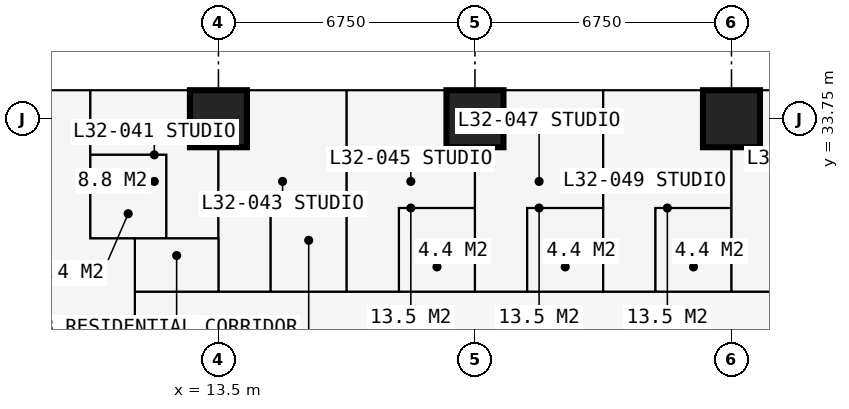
"""IFC4 building model, lengths in metres.
Left out: names, types, materials, properties, quantities, classifications, styles, units other than length and angle.
Written with IfcOpenShell. Run it as: python <this file> out.ifc"""

import sys

from ifc_helpers import new_model, si_unit, direction, frame, frame_2d, origin, origin_2d, place, context, subcontext, project, spatial, rectangle, extrude, element, fill, save


model = new_model("IFC4")
c1 = context("Model", 3, precision=1e-05, world=origin(), true_north=direction((0.0, 1.0)))
c2 = subcontext(c1, "Body", "Model", "MODEL_VIEW")
j1 = project(units=[si_unit("LENGTHUNIT", "METRE"), si_unit("PLANEANGLEUNIT", "RADIAN")], contexts=[c1])
p1 = place(None, origin())
s1 = spatial("IfcSite", under=j1, at=p1, CompositionType="ELEMENT")
p2 = place(p1, origin())
s2 = spatial("IfcBuilding", under=s1, at=p2, CompositionType="ELEMENT")
p3 = place(p2, frame((0.0, 0.0, 119.7)))
s3 = spatial("IfcBuildingStorey", under=s2, at=p3, CompositionType="ELEMENT", Elevation=119.7)
for number, where, z_axis, x_axis in (
    (1, (13.5, 33.75, 0.0), (0.0, 0.0, 1.0), (1.0, 0.0, 0.0)),
    (2, (20.25, 33.75, 0.0), (0.0, 0.0, 1.0), (1.0, 0.0, 0.0)),
    (3, (27.0, 33.75, 0.0), (0.0, 0.0, 1.0), (1.0, 0.0, 0.0)),
):
    element("IfcColumn", number, at=place(p3, frame(where, z_axis=z_axis, x_axis=x_axis)), inside=s3, PredefinedType="COLUMN", context=c2, shape_type="SweptSolid", body=[
        extrude(rectangle(XDim=1.5, YDim=1.5, at=origin_2d()), origin(), (0.0, 0.0, 1.0), 3.6),
    ])
p4 = place(p3, frame((20.25, 34.5, 0.0), z_axis=(0.0, 0.0, 1.0), x_axis=(1.0, 0.0, 0.0)))
e4 = element("IfcWall", 4, at=p4, inside=s3, PredefinedType="SOLIDWALL", context=c2, shape_type="SweptSolid", body=[
    extrude(rectangle(XDim=6.75, YDim=0.15, at=frame_2d((3.375, 0.0))), origin(), (0.0, 0.0, 1.0), 3.375),
])
p5 = place(p4, frame((0.863, 0.0, 0.0)))
e5 = element("IfcOpeningElement", 5, at=p5, cuts=e4, PredefinedType="OPENING", context=c2, shape_type="SweptSolid", body=[
    extrude(rectangle(XDim=1.0, YDim=2.2, at=frame_2d((0.5, 1.1))), frame((0.0, 0.085, 0.0), z_axis=(0.0, -1.0, 0.0), x_axis=(1.0, 0.0, 0.0)), (0.0, 0.0, 1.0), 0.17),
])
p6 = place(p4, frame((1.975, 0.0, 0.9)))
e6 = element("IfcOpeningElement", 6, at=p6, cuts=e4, PredefinedType="OPENING", context=c2, shape_type="SweptSolid", body=[
    extrude(rectangle(XDim=1.2, YDim=1.8, at=frame_2d((0.6, 0.9))), frame((0.0, 0.085, 0.0), z_axis=(0.0, -1.0, 0.0), x_axis=(1.0, 0.0, 0.0)), (0.0, 0.0, 1.0), 0.17),
])
p7 = place(p4, frame((4.887, 0.0, 0.0)))
e7 = element("IfcOpeningElement", 7, at=p7, cuts=e4, PredefinedType="OPENING", context=c2, shape_type="SweptSolid", body=[
    extrude(rectangle(XDim=1.0, YDim=2.2, at=frame_2d((0.5, 1.1))), frame((0.0, 0.085, 0.0), z_axis=(0.0, -1.0, 0.0), x_axis=(1.0, 0.0, 0.0)), (0.0, 0.0, 1.0), 0.17),
])
p8 = place(p4, frame((3.575, 0.0, 0.9)))
e8 = element("IfcOpeningElement", 8, at=p8, cuts=e4, PredefinedType="OPENING", context=c2, shape_type="SweptSolid", body=[
    extrude(rectangle(XDim=1.2, YDim=1.8, at=frame_2d((0.6, 0.9))), frame((0.0, 0.085, 0.0), z_axis=(0.0, -1.0, 0.0), x_axis=(1.0, 0.0, 0.0)), (0.0, 0.0, 1.0), 0.17),
])
p9 = place(p3, frame((23.625, 34.6, 0.0), z_axis=(0.0, 0.0, 1.0), x_axis=(0.0, 1.0, 0.0)))
e9 = element("IfcWall", 9, at=p9, inside=s3, PredefinedType="USERDEFINED", context=c2, shape_type="SweptSolid", body=[
    extrude(rectangle(XDim=2.2, YDim=1.0, at=frame_2d((1.1, 0.0))), origin(), (0.0, 0.0, 1.0), 0.9),
])
p10 = place(p3, frame((10.125, 30.6, 0.0), z_axis=(0.0, 0.0, 1.0), x_axis=(0.0, 1.0, 0.0)))
e10 = element("IfcWall", 10, at=p10, inside=s3, PredefinedType="PARTITIONING", context=c2, shape_type="SweptSolid", body=[
    extrude(rectangle(XDim=3.884, YDim=0.1, at=frame_2d((1.942, 0.0))), origin(), (0.0, 0.0, 1.0), 3.375),
])
p11 = place(p3, frame((10.125, 30.6, 0.0), z_axis=(0.0, 0.0, 1.0), x_axis=(1.0, 0.0, 0.0)))
e11 = element("IfcWall", 11, at=p11, inside=s3, PredefinedType="PARTITIONING", context=c2, shape_type="SweptSolid", body=[
    extrude(rectangle(XDim=3.375, YDim=0.1, at=frame_2d((1.688, 0.0))), origin(), (0.0, 0.0, 1.0), 3.375),
])
p12 = place(p11, frame((2.2, 0.0, 0.0)))
e12 = element("IfcOpeningElement", 12, at=p12, cuts=e11, PredefinedType="OPENING", context=c2, shape_type="SweptSolid", body=[
    extrude(rectangle(XDim=0.95, YDim=2.2, at=frame_2d((0.475, 1.1))), frame((0.0, 0.06, 0.0), z_axis=(0.0, -1.0, 0.0), x_axis=(1.0, 0.0, 0.0)), (0.0, 0.0, 1.0), 0.12),
])
p13 = place(p3, frame((10.125, 32.8, 0.0), z_axis=(0.0, 0.0, 1.0), x_axis=(1.0, 0.0, 0.0)))
e13 = element("IfcWall", 13, at=p13, inside=s3, PredefinedType="PARTITIONING", context=c2, shape_type="SweptSolid", body=[
    extrude(rectangle(XDim=2.0, YDim=0.1, at=frame_2d((1.0, 0.0))), origin(), (0.0, 0.0, 1.0), 3.375),
])
p14 = place(p3, frame((11.3, 11.3, 0.0), z_axis=(0.0, 0.0, 1.0), x_axis=(0.0, 1.0, 0.0)))
e14 = element("IfcWall", 14, at=p14, inside=s3, PredefinedType="PARTITIONING", context=c2, shape_type="SweptSolid", body=[
    extrude(rectangle(XDim=19.3, YDim=0.15, at=frame_2d((9.65, 0.0))), origin(), (0.0, 0.0, 1.0), 3.375),
])
p15 = place(p14, frame((18.1, 0.0, 0.0)))
e15 = element("IfcOpeningElement", 15, at=p15, cuts=e14, PredefinedType="OPENING", context=c2, shape_type="SweptSolid", body=[
    extrude(rectangle(XDim=1.0, YDim=2.2, at=frame_2d((0.5, 1.1))), frame((0.0, 0.085, 0.0), z_axis=(0.0, -1.0, 0.0), x_axis=(1.0, 0.0, 0.0)), (0.0, 0.0, 1.0), 0.17),
])
p16 = place(p14, frame((10.137, 0.0, 0.0)))
e16 = element("IfcOpeningElement", 16, at=p16, cuts=e14, PredefinedType="OPENING", context=c2, shape_type="SweptSolid", body=[
    extrude(rectangle(XDim=1.0, YDim=2.2, at=frame_2d((0.5, 1.1))), frame((0.0, 0.085, 0.0), z_axis=(0.0, -1.0, 0.0), x_axis=(1.0, 0.0, 0.0)), (0.0, 0.0, 1.0), 0.17),
])
p17 = place(p3, frame((11.3, 29.2, 0.0), z_axis=(0.0, 0.0, 1.0), x_axis=(1.0, 0.0, 0.0)))
e17 = element("IfcWall", 17, at=p17, inside=s3, PredefinedType="PARTITIONING", context=c2, shape_type="SweptSolid", body=[
    extrude(rectangle(XDim=19.075, YDim=0.15, at=frame_2d((9.538, 0.0))), origin(), (0.0, 0.0, 1.0), 3.375),
])
p18 = place(p17, frame((5.825, 0.0, 0.0)))
e18 = element("IfcOpeningElement", 18, at=p18, cuts=e17, PredefinedType="OPENING", context=c2, shape_type="SweptSolid", body=[
    extrude(rectangle(XDim=0.95, YDim=2.2, at=frame_2d((0.475, 1.1))), frame((0.0, 0.085, 0.0), z_axis=(0.0, -1.0, 0.0), x_axis=(1.0, 0.0, 0.0)), (0.0, 0.0, 1.0), 0.17),
])
p19 = place(p17, frame((9.2, 0.0, 0.0)))
e19 = element("IfcOpeningElement", 19, at=p19, cuts=e17, PredefinedType="OPENING", context=c2, shape_type="SweptSolid", body=[
    extrude(rectangle(XDim=0.95, YDim=2.2, at=frame_2d((0.475, 1.1))), frame((0.0, 0.085, 0.0), z_axis=(0.0, -1.0, 0.0), x_axis=(1.0, 0.0, 0.0)), (0.0, 0.0, 1.0), 0.17),
])
p20 = place(p17, frame((12.575, 0.0, 0.0)))
e20 = element("IfcOpeningElement", 20, at=p20, cuts=e17, PredefinedType="OPENING", context=c2, shape_type="SweptSolid", body=[
    extrude(rectangle(XDim=0.95, YDim=2.2, at=frame_2d((0.475, 1.1))), frame((0.0, 0.085, 0.0), z_axis=(0.0, -1.0, 0.0), x_axis=(1.0, 0.0, 0.0)), (0.0, 0.0, 1.0), 0.17),
])
p21 = place(p17, frame((15.95, 0.0, 0.0)))
e21 = element("IfcOpeningElement", 21, at=p21, cuts=e17, PredefinedType="OPENING", context=c2, shape_type="SweptSolid", body=[
    extrude(rectangle(XDim=0.95, YDim=2.2, at=frame_2d((0.475, 1.1))), frame((0.0, 0.085, 0.0), z_axis=(0.0, -1.0, 0.0), x_axis=(1.0, 0.0, 0.0)), (0.0, 0.0, 1.0), 0.17),
])
p22 = place(p17, frame((0.6, 0.0, 0.0)))
e22 = element("IfcOpeningElement", 22, at=p22, cuts=e17, PredefinedType="OPENING", context=c2, shape_type="SweptSolid", body=[
    extrude(rectangle(XDim=1.0, YDim=2.2, at=frame_2d((0.5, 1.1))), frame((0.0, 0.085, 0.0), z_axis=(0.0, -1.0, 0.0), x_axis=(1.0, 0.0, 0.0)), (0.0, 0.0, 1.0), 0.17),
])
p23 = place(p3, frame((12.125, 30.6, 0.0), z_axis=(0.0, 0.0, 1.0), x_axis=(0.0, 1.0, 0.0)))
e23 = element("IfcWall", 23, at=p23, inside=s3, PredefinedType="PARTITIONING", context=c2, shape_type="SweptSolid", body=[
    extrude(rectangle(XDim=2.2, YDim=0.1, at=frame_2d((1.1, 0.0))), origin(), (0.0, 0.0, 1.0), 3.375),
])
p24 = place(p23, frame((0.65, 0.0, 0.0)))
e24 = element("IfcOpeningElement", 24, at=p24, cuts=e23, PredefinedType="OPENING", context=c2, shape_type="SweptSolid", body=[
    extrude(rectangle(XDim=0.9, YDim=2.2, at=frame_2d((0.45, 1.1))), frame((0.0, 0.06, 0.0), z_axis=(0.0, -1.0, 0.0), x_axis=(1.0, 0.0, 0.0)), (0.0, 0.0, 1.0), 0.12),
])
p25 = place(p3, frame((13.5, 29.2, 0.0), z_axis=(0.0, 0.0, 1.0), x_axis=(0.0, 1.0, 0.0)))
e25 = element("IfcWall", 25, at=p25, inside=s3, PredefinedType="PARTITIONING", context=c2, shape_type="SweptSolid", body=[
    extrude(rectangle(XDim=5.284, YDim=0.175, at=frame_2d((2.642, 0.0))), origin(), (0.0, 0.0, 1.0), 2.61),
])
p26 = place(p25, frame((0.25, 0.0, 0.0)))
e26 = element("IfcOpeningElement", 26, at=p26, cuts=e25, PredefinedType="OPENING", context=c2, shape_type="SweptSolid", body=[
    extrude(rectangle(XDim=0.95, YDim=2.2, at=frame_2d((0.475, 1.1))), frame((0.0, 0.097, 0.0), z_axis=(0.0, -1.0, 0.0), x_axis=(1.0, 0.0, 0.0)), (0.0, 0.0, 1.0), 0.195),
])
p27 = place(p3, frame((14.875, 29.2, 0.0), z_axis=(0.0, 0.0, 1.0), x_axis=(0.0, 1.0, 0.0)))
e27 = element("IfcWall", 27, at=p27, inside=s3, PredefinedType="PARTITIONING", context=c2, shape_type="SweptSolid", body=[
    extrude(rectangle(XDim=2.2, YDim=0.1, at=frame_2d((1.1, 0.0))), origin(), (0.0, 0.0, 1.0), 3.375),
])
p28 = place(p27, frame((0.65, 0.0, 0.0)))
e28 = element("IfcOpeningElement", 28, at=p28, cuts=e27, PredefinedType="OPENING", context=c2, shape_type="SweptSolid", body=[
    extrude(rectangle(XDim=0.9, YDim=2.2, at=frame_2d((0.45, 1.1))), frame((0.0, 0.06, 0.0), z_axis=(0.0, -1.0, 0.0), x_axis=(1.0, 0.0, 0.0)), (0.0, 0.0, 1.0), 0.12),
])
p29 = place(p3, frame((14.875, 31.4, 0.0), z_axis=(0.0, 0.0, 1.0), x_axis=(1.0, 0.0, 0.0)))
e29 = element("IfcWall", 29, at=p29, inside=s3, PredefinedType="PARTITIONING", context=c2, shape_type="SweptSolid", body=[
    extrude(rectangle(XDim=2.0, YDim=0.1, at=frame_2d((1.0, 0.0))), origin(), (0.0, 0.0, 1.0), 3.375),
])
p30 = place(p3, frame((16.875, 29.2, 0.0), z_axis=(0.0, 0.0, 1.0), x_axis=(0.0, 1.0, 0.0)))
e30 = element("IfcWall", 30, at=p30, inside=s3, PredefinedType="PARTITIONING", context=c2, shape_type="SweptSolid", body=[
    extrude(rectangle(XDim=5.284, YDim=0.175, at=frame_2d((2.642, 0.0))), origin(), (0.0, 0.0, 1.0), 3.375),
])
p31 = place(p3, frame((18.25, 29.2, 0.0), z_axis=(0.0, 0.0, 1.0), x_axis=(0.0, 1.0, 0.0)))
e31 = element("IfcWall", 31, at=p31, inside=s3, PredefinedType="PARTITIONING", context=c2, shape_type="SweptSolid", body=[
    extrude(rectangle(XDim=2.2, YDim=0.1, at=frame_2d((1.1, 0.0))), origin(), (0.0, 0.0, 1.0), 3.375),
])
p32 = place(p31, frame((0.65, 0.0, 0.0)))
e32 = element("IfcOpeningElement", 32, at=p32, cuts=e31, PredefinedType="OPENING", context=c2, shape_type="SweptSolid", body=[
    extrude(rectangle(XDim=0.9, YDim=2.2, at=frame_2d((0.45, 1.1))), frame((0.0, 0.06, 0.0), z_axis=(0.0, -1.0, 0.0), x_axis=(1.0, 0.0, 0.0)), (0.0, 0.0, 1.0), 0.12),
])
p33 = place(p3, frame((18.25, 31.4, 0.0), z_axis=(0.0, 0.0, 1.0), x_axis=(1.0, 0.0, 0.0)))
e33 = element("IfcWall", 33, at=p33, inside=s3, PredefinedType="PARTITIONING", context=c2, shape_type="SweptSolid", body=[
    extrude(rectangle(XDim=2.0, YDim=0.1, at=frame_2d((1.0, 0.0))), origin(), (0.0, 0.0, 1.0), 3.375),
])
p34 = place(p3, frame((20.25, 29.2, 0.0), z_axis=(0.0, 0.0, 1.0), x_axis=(0.0, 1.0, 0.0)))
e34 = element("IfcWall", 34, at=p34, inside=s3, PredefinedType="PARTITIONING", context=c2, shape_type="SweptSolid", body=[
    extrude(rectangle(XDim=5.284, YDim=0.175, at=frame_2d((2.642, 0.0))), origin(), (0.0, 0.0, 1.0), 2.61),
])
p35 = place(p3, frame((21.625, 29.2, 0.0), z_axis=(0.0, 0.0, 1.0), x_axis=(0.0, 1.0, 0.0)))
e35 = element("IfcWall", 35, at=p35, inside=s3, PredefinedType="PARTITIONING", context=c2, shape_type="SweptSolid", body=[
    extrude(rectangle(XDim=2.2, YDim=0.1, at=frame_2d((1.1, 0.0))), origin(), (0.0, 0.0, 1.0), 3.375),
])
p36 = place(p35, frame((0.65, 0.0, 0.0)))
e36 = element("IfcOpeningElement", 36, at=p36, cuts=e35, PredefinedType="OPENING", context=c2, shape_type="SweptSolid", body=[
    extrude(rectangle(XDim=0.9, YDim=2.2, at=frame_2d((0.45, 1.1))), frame((0.0, 0.06, 0.0), z_axis=(0.0, -1.0, 0.0), x_axis=(1.0, 0.0, 0.0)), (0.0, 0.0, 1.0), 0.12),
])
p37 = place(p3, frame((21.625, 31.4, 0.0), z_axis=(0.0, 0.0, 1.0), x_axis=(1.0, 0.0, 0.0)))
e37 = element("IfcWall", 37, at=p37, inside=s3, PredefinedType="PARTITIONING", context=c2, shape_type="SweptSolid", body=[
    extrude(rectangle(XDim=2.0, YDim=0.1, at=frame_2d((1.0, 0.0))), origin(), (0.0, 0.0, 1.0), 3.375),
])
p38 = place(p3, frame((23.625, 29.2, 0.0), z_axis=(0.0, 0.0, 1.0), x_axis=(0.0, 1.0, 0.0)))
e38 = element("IfcWall", 38, at=p38, inside=s3, PredefinedType="PARTITIONING", context=c2, shape_type="SweptSolid", body=[
    extrude(rectangle(XDim=5.284, YDim=0.175, at=frame_2d((2.642, 0.0))), origin(), (0.0, 0.0, 1.0), 3.375),
])
p39 = place(p3, frame((25.0, 29.2, 0.0), z_axis=(0.0, 0.0, 1.0), x_axis=(0.0, 1.0, 0.0)))
e39 = element("IfcWall", 39, at=p39, inside=s3, PredefinedType="PARTITIONING", context=c2, shape_type="SweptSolid", body=[
    extrude(rectangle(XDim=2.2, YDim=0.1, at=frame_2d((1.1, 0.0))), origin(), (0.0, 0.0, 1.0), 3.375),
])
p40 = place(p39, frame((0.65, 0.0, 0.0)))
e40 = element("IfcOpeningElement", 40, at=p40, cuts=e39, PredefinedType="OPENING", context=c2, shape_type="SweptSolid", body=[
    extrude(rectangle(XDim=0.9, YDim=2.2, at=frame_2d((0.45, 1.1))), frame((0.0, 0.06, 0.0), z_axis=(0.0, -1.0, 0.0), x_axis=(1.0, 0.0, 0.0)), (0.0, 0.0, 1.0), 0.12),
])
p41 = place(p3, frame((25.0, 31.4, 0.0), z_axis=(0.0, 0.0, 1.0), x_axis=(1.0, 0.0, 0.0)))
e41 = element("IfcWall", 41, at=p41, inside=s3, PredefinedType="PARTITIONING", context=c2, shape_type="SweptSolid", body=[
    extrude(rectangle(XDim=2.0, YDim=0.1, at=frame_2d((1.0, 0.0))), origin(), (0.0, 0.0, 1.0), 3.375),
])
p42 = place(p3, frame((27.0, 29.2, 0.0), z_axis=(0.0, 0.0, 1.0), x_axis=(0.0, 1.0, 0.0)))
e42 = element("IfcWall", 42, at=p42, inside=s3, PredefinedType="PARTITIONING", context=c2, shape_type="SweptSolid", body=[
    extrude(rectangle(XDim=5.284, YDim=0.175, at=frame_2d((2.642, 0.0))), origin(), (0.0, 0.0, 1.0), 2.806),
])
p43 = place(p5, origin())
e43 = element("IfcDoor", 43, at=p43, inside=s3, OperationType="SINGLE_SWING_LEFT", PredefinedType="DOOR", context=c2, shape_type="SweptSolid", body=[
    extrude(rectangle(XDim=1.0, YDim=2.2, at=frame_2d((0.5, 1.1))), frame((0.0, 0.025, 0.0), z_axis=(0.0, -1.0, 0.0), x_axis=(1.0, 0.0, 0.0)), (0.0, 0.0, 1.0), 0.05),
])
fill(e5, e43)
p44 = place(p6, origin())
e44 = element("IfcWindow", 44, at=p44, inside=s3, PartitioningType="SINGLE_PANEL", PredefinedType="WINDOW", context=c2, shape_type="SweptSolid", body=[
    extrude(rectangle(XDim=1.2, YDim=1.8, at=frame_2d((0.6, 0.9))), frame((0.0, 0.03, 0.0), z_axis=(0.0, -1.0, 0.0), x_axis=(1.0, 0.0, 0.0)), (0.0, 0.0, 1.0), 0.06),
])
fill(e6, e44)
p45 = place(p7, origin())
e45 = element("IfcDoor", 45, at=p45, inside=s3, OperationType="SINGLE_SWING_RIGHT", PredefinedType="DOOR", context=c2, shape_type="SweptSolid", body=[
    extrude(rectangle(XDim=1.0, YDim=2.2, at=frame_2d((0.5, 1.1))), frame((0.0, 0.025, 0.0), z_axis=(0.0, -1.0, 0.0), x_axis=(1.0, 0.0, 0.0)), (0.0, 0.0, 1.0), 0.05),
])
fill(e7, e45)
p46 = place(p8, origin())
e46 = element("IfcWindow", 46, at=p46, inside=s3, PartitioningType="SINGLE_PANEL", PredefinedType="WINDOW", context=c2, shape_type="SweptSolid", body=[
    extrude(rectangle(XDim=1.2, YDim=1.8, at=frame_2d((0.6, 0.9))), frame((0.0, 0.03, 0.0), z_axis=(0.0, -1.0, 0.0), x_axis=(1.0, 0.0, 0.0)), (0.0, 0.0, 1.0), 0.06),
])
fill(e8, e46)
p47 = place(p12, origin())
e47 = element("IfcDoor", 47, at=p47, inside=s3, OperationType="SINGLE_SWING_LEFT", PredefinedType="DOOR", context=c2, shape_type="SweptSolid", body=[
    extrude(rectangle(XDim=0.95, YDim=2.2, at=frame_2d((0.475, 1.1))), frame((0.0, 0.025, 0.0), z_axis=(0.0, -1.0, 0.0), x_axis=(1.0, 0.0, 0.0)), (0.0, 0.0, 1.0), 0.05),
])
fill(e12, e47)
p48 = place(p24, origin())
e48 = element("IfcDoor", 48, at=p48, inside=s3, OperationType="SINGLE_SWING_RIGHT", PredefinedType="DOOR", context=c2, shape_type="SweptSolid", body=[
    extrude(rectangle(XDim=0.9, YDim=2.2, at=frame_2d((0.45, 1.1))), frame((0.0, 0.025, 0.0), z_axis=(0.0, -1.0, 0.0), x_axis=(1.0, 0.0, 0.0)), (0.0, 0.0, 1.0), 0.05),
])
fill(e24, e48)
p49 = place(p26, origin())
e49 = element("IfcDoor", 49, at=p49, inside=s3, OperationType="SINGLE_SWING_LEFT", PredefinedType="DOOR", context=c2, shape_type="SweptSolid", body=[
    extrude(rectangle(XDim=0.95, YDim=2.2, at=frame_2d((0.475, 1.1))), frame((0.0, 0.025, 0.0), z_axis=(0.0, -1.0, 0.0), x_axis=(1.0, 0.0, 0.0)), (0.0, 0.0, 1.0), 0.05),
])
fill(e26, e49)
p50 = place(p28, origin())
e50 = element("IfcDoor", 50, at=p50, inside=s3, OperationType="SINGLE_SWING_RIGHT", PredefinedType="DOOR", context=c2, shape_type="SweptSolid", body=[
    extrude(rectangle(XDim=0.9, YDim=2.2, at=frame_2d((0.45, 1.1))), frame((0.0, 0.025, 0.0), z_axis=(0.0, -1.0, 0.0), x_axis=(1.0, 0.0, 0.0)), (0.0, 0.0, 1.0), 0.05),
])
fill(e28, e50)
p51 = place(p18, origin())
e51 = element("IfcDoor", 51, at=p51, inside=s3, OperationType="SINGLE_SWING_LEFT", PredefinedType="DOOR", context=c2, shape_type="SweptSolid", body=[
    extrude(rectangle(XDim=0.95, YDim=2.2, at=frame_2d((0.475, 1.1))), frame((0.0, 0.025, 0.0), z_axis=(0.0, -1.0, 0.0), x_axis=(1.0, 0.0, 0.0)), (0.0, 0.0, 1.0), 0.05),
])
fill(e18, e51)
p52 = place(p32, origin())
e52 = element("IfcDoor", 52, at=p52, inside=s3, OperationType="SINGLE_SWING_RIGHT", PredefinedType="DOOR", context=c2, shape_type="SweptSolid", body=[
    extrude(rectangle(XDim=0.9, YDim=2.2, at=frame_2d((0.45, 1.1))), frame((0.0, 0.025, 0.0), z_axis=(0.0, -1.0, 0.0), x_axis=(1.0, 0.0, 0.0)), (0.0, 0.0, 1.0), 0.05),
])
fill(e32, e52)
p53 = place(p19, origin())
e53 = element("IfcDoor", 53, at=p53, inside=s3, OperationType="SINGLE_SWING_LEFT", PredefinedType="DOOR", context=c2, shape_type="SweptSolid", body=[
    extrude(rectangle(XDim=0.95, YDim=2.2, at=frame_2d((0.475, 1.1))), frame((0.0, 0.025, 0.0), z_axis=(0.0, -1.0, 0.0), x_axis=(1.0, 0.0, 0.0)), (0.0, 0.0, 1.0), 0.05),
])
fill(e19, e53)
p54 = place(p36, origin())
e54 = element("IfcDoor", 54, at=p54, inside=s3, OperationType="SINGLE_SWING_RIGHT", PredefinedType="DOOR", context=c2, shape_type="SweptSolid", body=[
    extrude(rectangle(XDim=0.9, YDim=2.2, at=frame_2d((0.45, 1.1))), frame((0.0, 0.025, 0.0), z_axis=(0.0, -1.0, 0.0), x_axis=(1.0, 0.0, 0.0)), (0.0, 0.0, 1.0), 0.05),
])
fill(e36, e54)
p55 = place(p20, origin())
e55 = element("IfcDoor", 55, at=p55, inside=s3, OperationType="SINGLE_SWING_LEFT", PredefinedType="DOOR", context=c2, shape_type="SweptSolid", body=[
    extrude(rectangle(XDim=0.95, YDim=2.2, at=frame_2d((0.475, 1.1))), frame((0.0, 0.025, 0.0), z_axis=(0.0, -1.0, 0.0), x_axis=(1.0, 0.0, 0.0)), (0.0, 0.0, 1.0), 0.05),
])
fill(e20, e55)
p56 = place(p40, origin())
e56 = element("IfcDoor", 56, at=p56, inside=s3, OperationType="SINGLE_SWING_RIGHT", PredefinedType="DOOR", context=c2, shape_type="SweptSolid", body=[
    extrude(rectangle(XDim=0.9, YDim=2.2, at=frame_2d((0.45, 1.1))), frame((0.0, 0.025, 0.0), z_axis=(0.0, -1.0, 0.0), x_axis=(1.0, 0.0, 0.0)), (0.0, 0.0, 1.0), 0.05),
])
fill(e40, e56)
p57 = place(p21, origin())
e57 = element("IfcDoor", 57, at=p57, inside=s3, OperationType="SINGLE_SWING_LEFT", PredefinedType="DOOR", context=c2, shape_type="SweptSolid", body=[
    extrude(rectangle(XDim=0.95, YDim=2.2, at=frame_2d((0.475, 1.1))), frame((0.0, 0.025, 0.0), z_axis=(0.0, -1.0, 0.0), x_axis=(1.0, 0.0, 0.0)), (0.0, 0.0, 1.0), 0.05),
])
fill(e21, e57)
p58 = place(p22, origin())
e58 = element("IfcDoor", 58, at=p58, inside=s3, OperationType="SINGLE_SWING_LEFT", PredefinedType="DOOR", context=c2, shape_type="SweptSolid", body=[
    extrude(rectangle(XDim=1.0, YDim=2.2, at=frame_2d((0.5, 1.1))), frame((0.0, 0.025, 0.0), z_axis=(0.0, -1.0, 0.0), x_axis=(1.0, 0.0, 0.0)), (0.0, 0.0, 1.0), 0.05),
])
fill(e22, e58)
p59 = place(p15, origin())
e59 = element("IfcDoor", 59, at=p59, inside=s3, OperationType="SINGLE_SWING_LEFT", PredefinedType="DOOR", context=c2, shape_type="SweptSolid", body=[
    extrude(rectangle(XDim=1.0, YDim=2.2, at=frame_2d((0.5, 1.1))), frame((0.0, 0.025, 0.0), z_axis=(0.0, -1.0, 0.0), x_axis=(1.0, 0.0, 0.0)), (0.0, 0.0, 1.0), 0.05),
])
fill(e15, e59)
save(model, sys.argv[1])
